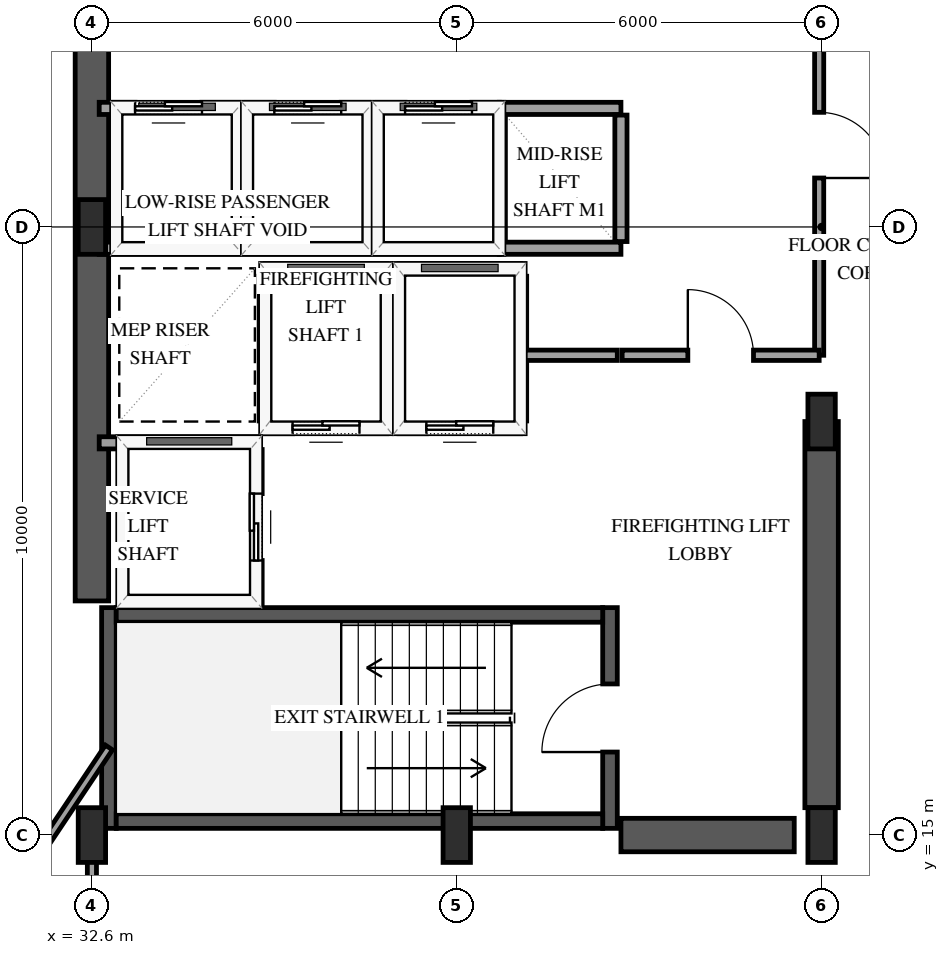
"""IFC4 building model, lengths in metres.
Left out: names, types, materials, properties, quantities, classifications, styles, units other than length and angle.
Written with IfcOpenShell. Run it as: python <this file> out.ifc"""

import sys

from ifc_helpers import new_model, si_unit, direction, frame, frame_2d, origin, origin_2d, place, context, subcontext, project, spatial, rectangle, extrude, element, fill, save


model = new_model("IFC4")
c1 = context("Model", 3, precision=1e-05, world=origin(), true_north=direction((0.0, 1.0)))
c2 = subcontext(c1, "Body", "Model", "MODEL_VIEW")
j1 = project(units=[si_unit("LENGTHUNIT", "METRE"), si_unit("PLANEANGLEUNIT", "RADIAN")], contexts=[c1])
p1 = place(None, origin())
s1 = spatial("IfcSite", under=j1, at=p1, CompositionType="ELEMENT")
p2 = place(p1, origin())
s2 = spatial("IfcBuilding", under=s1, at=p2, CompositionType="ELEMENT")
p3 = place(p2, frame((0.0, 0.0, 91.3)))
s3 = spatial("IfcBuildingStorey", under=s2, at=p3, CompositionType="ELEMENT", Elevation=91.3)
p4 = place(p3, frame((32.88, 15.11, 0.0), z_axis=(0.0, 0.0, 1.0), x_axis=(0.0, 1.0, 0.0)))
e1 = element("IfcWall", 1, at=p4, inside=s3, PredefinedType="SHEAR", context=c2, shape_type="SweptSolid", body=[
    extrude(rectangle(XDim=3.63, YDim=0.24, at=frame_2d((1.815, 0.0))), origin(), (0.0, 0.0, 1.0), 3.9),
])
p5 = place(p3, frame((41.12, 15.11, 0.0), z_axis=(0.0, 0.0, 1.0), x_axis=(0.0, 1.0, 0.0)))
e2 = element("IfcWall", 2, at=p5, inside=s3, PredefinedType="SHEAR", context=c2, shape_type="SweptSolid", body=[
    extrude(rectangle(XDim=3.63, YDim=0.24, at=frame_2d((1.815, 0.0))), origin(), (0.0, 0.0, 1.0), 3.9),
])
p6 = place(p5, frame((1.255, 0.0, 0.0)))
e3 = element("IfcOpeningElement", 3, at=p6, cuts=e2, PredefinedType="OPENING", context=c2, shape_type="SweptSolid", body=[
    extrude(rectangle(XDim=1.12, YDim=2.15, at=frame_2d((0.56, 1.075))), frame((0.0, 0.13, 0.0), z_axis=(0.0, -1.0, 0.0), x_axis=(1.0, 0.0, 0.0)), (0.0, 0.0, 1.0), 0.26),
])
for number, where, z_axis, x_axis in (
    (4, (33.0, 15.23, 0.0), (0.0, 0.0, 1.0), (1.0, 0.0, 0.0)),
    (5, (33.0, 18.62, 0.0), (0.0, 0.0, 1.0), (1.0, 0.0, 0.0)),
):
    element("IfcWall", number, at=place(p3, frame(where, z_axis=z_axis, x_axis=x_axis)), inside=s3, PredefinedType="SHEAR", context=c2, shape_type="SweptSolid", body=[
        extrude(rectangle(XDim=8.0, YDim=0.24, at=frame_2d((4.0, 0.0))), origin(), (0.0, 0.0, 1.0), 3.9),
    ])
p7 = place(p3, frame((32.6, 18.85, 0.0), z_axis=(0.0, 0.0, 1.0), x_axis=(0.0, 1.0, 0.0)))
e6 = element("IfcWall", 6, at=p7, inside=s3, PredefinedType="SHEAR", context=c2, shape_type="SweptSolid", body=[
    extrude(rectangle(XDim=12.3, YDim=0.55, at=frame_2d((6.15, 0.0))), origin(), (0.0, 0.0, 1.0), 3.9),
])
p8 = place(p3, frame((41.3, 15.0, 0.0), z_axis=(0.0, 0.0, 1.0), x_axis=(1.0, 0.0, 0.0)))
e7 = element("IfcWall", 7, at=p8, inside=s3, PredefinedType="SHEAR", context=c2, shape_type="SweptSolid", body=[
    extrude(rectangle(XDim=2.85, YDim=0.55, at=frame_2d((1.425, 0.0))), origin(), (0.0, 0.0, 1.0), 3.9),
])
p9 = place(p3, frame((44.6, 15.45, 0.0), z_axis=(0.0, 0.0, 1.0), x_axis=(0.0, 1.0, 0.0)))
e8 = element("IfcWall", 8, at=p9, inside=s3, PredefinedType="SHEAR", context=c2, shape_type="SweptSolid", body=[
    extrude(rectangle(XDim=6.35, YDim=0.55, at=frame_2d((3.175, 0.0))), origin(), (0.0, 0.0, 1.0), 3.9),
])
for number, where, z_axis, x_axis in (
    (9, (32.6, 15.0, 0.0), (0.0, 0.0, 1.0), (1.0, 0.0, 0.0)),
    (10, (32.6, 25.0, 0.0), (0.0, 0.0, 1.0), (1.0, 0.0, 0.0)),
    (11, (38.6, 15.0, 0.0), (0.0, 0.0, 1.0), (1.0, 0.0, 0.0)),
    (12, (44.6, 15.0, 0.0), (0.0, 0.0, 1.0), (1.0, 0.0, 0.0)),
    (13, (44.6, 21.8, 0.0), (0.0, 0.0, 1.0), (1.0, 0.0, 0.0)),
):
    element("IfcColumn", number, at=place(p3, frame(where, z_axis=z_axis, x_axis=x_axis)), inside=s3, PredefinedType="PILASTER", context=c2, shape_type="SweptSolid", body=[
        extrude(rectangle(XDim=0.45, YDim=0.9, at=origin_2d()), origin(), (0.0, 0.0, 1.0), 3.9),
    ])
p10 = place(p3, frame((35.45, 21.7, 0.0), z_axis=(0.0, 0.0, 1.0), x_axis=(1.0, 0.0, 0.0)))
e14 = element("IfcWall", 14, at=p10, inside=s3, PredefinedType="SOLIDWALL", context=c2, shape_type="SweptSolid", body=[
    extrude(rectangle(XDim=2.0, YDim=0.2, at=frame_2d((1.0, 0.0))), origin(), (0.0, 0.0, 1.0), 3.6),
])
p11 = place(p10, frame((0.45, 0.0, 0.0)))
e15 = element("IfcOpeningElement", 15, at=p11, cuts=e14, PredefinedType="OPENING", context=c2, shape_type="SweptSolid", body=[
    extrude(rectangle(XDim=1.1, YDim=2.15, at=frame_2d((0.55, 1.075))), frame((0.0, 0.11, 0.0), z_axis=(0.0, -1.0, 0.0), x_axis=(1.0, 0.0, 0.0)), (0.0, 0.0, 1.0), 0.22),
])
p12 = place(p3, frame((35.45, 24.3, 0.0), z_axis=(0.0, 0.0, 1.0), x_axis=(1.0, 0.0, 0.0)))
e16 = element("IfcWall", 16, at=p12, inside=s3, PredefinedType="SOLIDWALL", context=c2, shape_type="SweptSolid", body=[
    extrude(rectangle(XDim=2.0, YDim=0.2, at=frame_2d((1.0, 0.0))), origin(), (0.0, 0.0, 1.0), 3.6),
])
for number, where, z_axis, x_axis in (
    (17, (35.45, 21.81, 0.0), (0.0, 0.0, 1.0), (0.0, 1.0, 0.0)),
    (18, (37.45, 21.81, 0.0), (0.0, 0.0, 1.0), (0.0, 1.0, 0.0)),
):
    element("IfcWall", number, at=place(p3, frame(where, z_axis=z_axis, x_axis=x_axis)), inside=s3, PredefinedType="SOLIDWALL", context=c2, shape_type="SweptSolid", body=[
        extrude(rectangle(XDim=2.38, YDim=0.2, at=frame_2d((1.19, 0.0))), origin(), (0.0, 0.0, 1.0), 3.6),
    ])
p13 = place(p3, frame((37.65, 21.7, 0.0), z_axis=(0.0, 0.0, 1.0), x_axis=(1.0, 0.0, 0.0)))
e19 = element("IfcWall", 19, at=p13, inside=s3, PredefinedType="SOLIDWALL", context=c2, shape_type="SweptSolid", body=[
    extrude(rectangle(XDim=2.0, YDim=0.2, at=frame_2d((1.0, 0.0))), origin(), (0.0, 0.0, 1.0), 3.6),
])
p14 = place(p13, frame((0.45, 0.0, 0.0)))
e20 = element("IfcOpeningElement", 20, at=p14, cuts=e19, PredefinedType="OPENING", context=c2, shape_type="SweptSolid", body=[
    extrude(rectangle(XDim=1.1, YDim=2.15, at=frame_2d((0.55, 1.075))), frame((0.0, 0.11, 0.0), z_axis=(0.0, -1.0, 0.0), x_axis=(1.0, 0.0, 0.0)), (0.0, 0.0, 1.0), 0.22),
])
p15 = place(p3, frame((37.65, 24.3, 0.0), z_axis=(0.0, 0.0, 1.0), x_axis=(1.0, 0.0, 0.0)))
e21 = element("IfcWall", 21, at=p15, inside=s3, PredefinedType="SOLIDWALL", context=c2, shape_type="SweptSolid", body=[
    extrude(rectangle(XDim=2.0, YDim=0.2, at=frame_2d((1.0, 0.0))), origin(), (0.0, 0.0, 1.0), 3.6),
])
p16 = place(p3, frame((39.65, 21.81, 0.0), z_axis=(0.0, 0.0, 1.0), x_axis=(0.0, 1.0, 0.0)))
e22 = element("IfcWall", 22, at=p16, inside=s3, PredefinedType="SOLIDWALL", context=c2, shape_type="SweptSolid", body=[
    extrude(rectangle(XDim=2.38, YDim=0.2, at=frame_2d((1.19, 0.0))), origin(), (0.0, 0.0, 1.0), 3.6),
])
p17 = place(p3, frame((32.72, 21.45, 0.0), z_axis=(0.0, 0.0, 1.0), x_axis=(1.0, 0.0, 0.0)))
e23 = element("IfcWall", 23, at=p17, inside=s3, PredefinedType="SOLIDWALL", context=c2, shape_type="SweptSolid", body=[
    extrude(rectangle(XDim=2.58, YDim=0.2, at=frame_2d((1.29, 0.0))), origin(), (0.0, 0.0, 1.0), 3.6),
])
p18 = place(p3, frame((35.3, 18.79, 0.0), z_axis=(0.0, 0.0, 1.0), x_axis=(0.0, 1.0, 0.0)))
e24 = element("IfcWall", 24, at=p18, inside=s3, PredefinedType="SOLIDWALL", context=c2, shape_type="SweptSolid", body=[
    extrude(rectangle(XDim=2.55, YDim=0.2, at=frame_2d((1.275, 0.0))), origin(), (0.0, 0.0, 1.0), 3.6),
])
p19 = place(p18, frame((0.725, 0.0, 0.0)))
e25 = element("IfcOpeningElement", 25, at=p19, cuts=e24, PredefinedType="OPENING", context=c2, shape_type="SweptSolid", body=[
    extrude(rectangle(XDim=1.1, YDim=2.15, at=frame_2d((0.55, 1.075))), frame((0.0, 0.11, 0.0), z_axis=(0.0, -1.0, 0.0), x_axis=(1.0, 0.0, 0.0)), (0.0, 0.0, 1.0), 0.22),
])
p20 = place(p3, frame((32.72, 24.65, 0.0), z_axis=(0.0, 0.0, 1.0), x_axis=(1.0, 0.0, 0.0)))
e26 = element("IfcWall", 26, at=p20, inside=s3, PredefinedType="SOLIDWALL", context=c2, shape_type="SweptSolid", body=[
    extrude(rectangle(XDim=2.28, YDim=0.2, at=frame_2d((1.14, 0.0))), origin(), (0.0, 0.0, 1.0), 3.6),
])
p21 = place(p3, frame((32.72, 26.95, 0.0), z_axis=(0.0, 0.0, 1.0), x_axis=(1.0, 0.0, 0.0)))
e27 = element("IfcWall", 27, at=p21, inside=s3, PredefinedType="SOLIDWALL", context=c2, shape_type="SweptSolid", body=[
    extrude(rectangle(XDim=2.28, YDim=0.2, at=frame_2d((1.14, 0.0))), origin(), (0.0, 0.0, 1.0), 3.6),
])
p22 = place(p21, frame((0.59, 0.0, 0.0)))
e28 = element("IfcOpeningElement", 28, at=p22, cuts=e27, PredefinedType="OPENING", context=c2, shape_type="SweptSolid", body=[
    extrude(rectangle(XDim=1.1, YDim=2.15, at=frame_2d((0.55, 1.075))), frame((0.0, 0.11, 0.0), z_axis=(0.0, -1.0, 0.0), x_axis=(1.0, 0.0, 0.0)), (0.0, 0.0, 1.0), 0.22),
])
p23 = place(p3, frame((35.0, 24.76, 0.0), z_axis=(0.0, 0.0, 1.0), x_axis=(0.0, 1.0, 0.0)))
e29 = element("IfcWall", 29, at=p23, inside=s3, PredefinedType="SOLIDWALL", context=c2, shape_type="SweptSolid", body=[
    extrude(rectangle(XDim=2.08, YDim=0.2, at=frame_2d((1.04, 0.0))), origin(), (0.0, 0.0, 1.0), 3.6),
])
p24 = place(p3, frame((35.15, 24.65, 0.0), z_axis=(0.0, 0.0, 1.0), x_axis=(1.0, 0.0, 0.0)))
e30 = element("IfcWall", 30, at=p24, inside=s3, PredefinedType="SOLIDWALL", context=c2, shape_type="SweptSolid", body=[
    extrude(rectangle(XDim=2.0, YDim=0.2, at=frame_2d((1.0, 0.0))), origin(), (0.0, 0.0, 1.0), 3.6),
])
p25 = place(p3, frame((35.15, 26.95, 0.0), z_axis=(0.0, 0.0, 1.0), x_axis=(1.0, 0.0, 0.0)))
e31 = element("IfcWall", 31, at=p25, inside=s3, PredefinedType="SOLIDWALL", context=c2, shape_type="SweptSolid", body=[
    extrude(rectangle(XDim=2.0, YDim=0.2, at=frame_2d((1.0, 0.0))), origin(), (0.0, 0.0, 1.0), 3.6),
])
p26 = place(p25, frame((0.45, 0.0, 0.0)))
e32 = element("IfcOpeningElement", 32, at=p26, cuts=e31, PredefinedType="OPENING", context=c2, shape_type="SweptSolid", body=[
    extrude(rectangle(XDim=1.1, YDim=2.15, at=frame_2d((0.55, 1.075))), frame((0.0, 0.11, 0.0), z_axis=(0.0, -1.0, 0.0), x_axis=(1.0, 0.0, 0.0)), (0.0, 0.0, 1.0), 0.22),
])
p27 = place(p3, frame((37.15, 24.76, 0.0), z_axis=(0.0, 0.0, 1.0), x_axis=(0.0, 1.0, 0.0)))
e33 = element("IfcWall", 33, at=p27, inside=s3, PredefinedType="SOLIDWALL", context=c2, shape_type="SweptSolid", body=[
    extrude(rectangle(XDim=2.08, YDim=0.2, at=frame_2d((1.04, 0.0))), origin(), (0.0, 0.0, 1.0), 3.6),
])
p28 = place(p3, frame((37.3, 24.65, 0.0), z_axis=(0.0, 0.0, 1.0), x_axis=(1.0, 0.0, 0.0)))
e34 = element("IfcWall", 34, at=p28, inside=s3, PredefinedType="SOLIDWALL", context=c2, shape_type="SweptSolid", body=[
    extrude(rectangle(XDim=2.0, YDim=0.2, at=frame_2d((1.0, 0.0))), origin(), (0.0, 0.0, 1.0), 3.6),
])
p29 = place(p3, frame((37.3, 26.95, 0.0), z_axis=(0.0, 0.0, 1.0), x_axis=(1.0, 0.0, 0.0)))
e35 = element("IfcWall", 35, at=p29, inside=s3, PredefinedType="SOLIDWALL", context=c2, shape_type="SweptSolid", body=[
    extrude(rectangle(XDim=2.0, YDim=0.2, at=frame_2d((1.0, 0.0))), origin(), (0.0, 0.0, 1.0), 3.6),
])
p30 = place(p29, frame((0.45, 0.0, 0.0)))
e36 = element("IfcOpeningElement", 36, at=p30, cuts=e35, PredefinedType="OPENING", context=c2, shape_type="SweptSolid", body=[
    extrude(rectangle(XDim=1.1, YDim=2.15, at=frame_2d((0.55, 1.075))), frame((0.0, 0.11, 0.0), z_axis=(0.0, -1.0, 0.0), x_axis=(1.0, 0.0, 0.0)), (0.0, 0.0, 1.0), 0.22),
])
p31 = place(p3, frame((39.3, 24.76, 0.0), z_axis=(0.0, 0.0, 1.0), x_axis=(0.0, 1.0, 0.0)))
e37 = element("IfcWall", 37, at=p31, inside=s3, PredefinedType="SOLIDWALL", context=c2, shape_type="SweptSolid", body=[
    extrude(rectangle(XDim=2.08, YDim=0.2, at=frame_2d((1.04, 0.0))), origin(), (0.0, 0.0, 1.0), 3.6),
])
for number, where, z_axis, x_axis in (
    (38, (39.3, 24.65, 0.0), (0.0, 0.0, 1.0), (1.0, 0.0, 0.0)),
    (39, (39.3, 26.95, 0.0), (0.0, 0.0, 1.0), (1.0, 0.0, 0.0)),
):
    element("IfcWall", number, at=place(p3, frame(where, z_axis=z_axis, x_axis=x_axis)), inside=s3, PredefinedType="SOLIDWALL", context=c2, shape_type="SweptSolid", body=[
        extrude(rectangle(XDim=2.0, YDim=0.2, at=frame_2d((1.0, 0.0))), origin(), (0.0, 0.0, 1.0), 3.6),
    ])
p32 = place(p3, frame((41.3, 24.76, 0.0), z_axis=(0.0, 0.0, 1.0), x_axis=(0.0, 1.0, 0.0)))
e40 = element("IfcWall", 40, at=p32, inside=s3, PredefinedType="SOLIDWALL", context=c2, shape_type="SweptSolid", body=[
    extrude(rectangle(XDim=2.08, YDim=0.2, at=frame_2d((1.04, 0.0))), origin(), (0.0, 0.0, 1.0), 3.6),
])
p33 = place(p3, frame((44.56, 29.8, 0.0), z_axis=(0.0, 0.0, 1.0), x_axis=(0.0, -1.0, 0.0)))
e41 = element("IfcWall", 41, at=p33, inside=s3, PredefinedType="PARTITIONING", context=c2, shape_type="SweptSolid", body=[
    extrude(rectangle(XDim=6.91, YDim=0.15, at=frame_2d((3.455, 0.0))), origin(), (0.0, 0.0, 1.0), 2.64),
])
p34 = place(p33, frame((2.915, 0.0, 0.0)))
e42 = element("IfcOpeningElement", 42, at=p34, cuts=e41, PredefinedType="OPENING", context=c2, shape_type="SweptSolid", body=[
    extrude(rectangle(XDim=1.08, YDim=2.15, at=frame_2d((0.54, 1.075))), frame((0.0, 0.085, 0.0), z_axis=(0.0, -1.0, 0.0), x_axis=(1.0, 0.0, 0.0)), (0.0, 0.0, 1.0), 0.17),
])
p35 = place(p3, frame((32.88, 16.44, 0.0), z_axis=(0.0, 0.0, 1.0), x_axis=(-0.555516811992, -0.83150530461, 0.0)))
e43 = element("IfcWall", 43, at=p35, inside=s3, PredefinedType="PARTITIONING", context=c2, shape_type="SweptSolid", body=[
    extrude(rectangle(XDim=4.138, YDim=0.14, at=frame_2d((2.069, 0.0))), origin(), (0.0, 0.0, 1.0), 3.6),
])
p36 = place(p3, frame((41.32, 22.89, 0.0), z_axis=(0.0, 0.0, 1.0), x_axis=(1.0, 0.0, 0.0)))
e44 = element("IfcWall", 44, at=p36, inside=s3, PredefinedType="PARTITIONING", context=c2, shape_type="SweptSolid", body=[
    extrude(rectangle(XDim=3.24, YDim=0.17, at=frame_2d((1.62, 0.0))), origin(), (0.0, 0.0, 1.0), 3.6),
])
p37 = place(p36, frame((1.08, 0.0, 0.0)))
e45 = element("IfcOpeningElement", 45, at=p37, cuts=e44, PredefinedType="OPENING", context=c2, shape_type="SweptSolid", body=[
    extrude(rectangle(XDim=1.08, YDim=2.15, at=frame_2d((0.54, 1.075))), frame((0.0, 0.095, 0.0), z_axis=(0.0, -1.0, 0.0), x_axis=(1.0, 0.0, 0.0)), (0.0, 0.0, 1.0), 0.19),
])
p38 = place(p3, frame((32.6, 13.02, 0.0), z_axis=(0.0, 0.0, 1.0), x_axis=(0.0, 1.0, 0.0)))
e46 = element("IfcWall", 46, at=p38, inside=s3, PredefinedType="PARTITIONING", context=c2, shape_type="SweptSolid", body=[
    extrude(rectangle(XDim=1.91, YDim=0.15, at=frame_2d((0.955, 0.0))), origin(), (0.0, 0.0, 1.0), 3.6),
])
p39 = place(p3, frame((39.72, 22.89, 0.0), z_axis=(0.0, 0.0, 1.0), x_axis=(1.0, 0.0, 0.0)))
e47 = element("IfcWall", 47, at=p39, inside=s3, PredefinedType="PARTITIONING", context=c2, shape_type="SweptSolid", body=[
    extrude(rectangle(XDim=1.52, YDim=0.17, at=frame_2d((0.76, 0.0))), origin(), (0.0, 0.0, 1.0), 3.6),
])
p40 = place(p11, origin())
e48 = element("IfcDoor", 48, at=p40, inside=s3, OperationType="SLIDING_TO_LEFT", PredefinedType="DOOR", context=c2, shape_type="SweptSolid", body=[
    extrude(rectangle(XDim=1.1, YDim=2.15, at=frame_2d((0.55, 1.075))), frame((0.0, 0.025, 0.0), z_axis=(0.0, -1.0, 0.0), x_axis=(1.0, 0.0, 0.0)), (0.0, 0.0, 1.0), 0.05),
])
fill(e15, e48)
p41 = place(p14, origin())
e49 = element("IfcDoor", 49, at=p41, inside=s3, OperationType="SLIDING_TO_LEFT", PredefinedType="DOOR", context=c2, shape_type="SweptSolid", body=[
    extrude(rectangle(XDim=1.1, YDim=2.15, at=frame_2d((0.55, 1.075))), frame((0.0, 0.025, 0.0), z_axis=(0.0, -1.0, 0.0), x_axis=(1.0, 0.0, 0.0)), (0.0, 0.0, 1.0), 0.05),
])
fill(e20, e49)
p42 = place(p19, origin())
e50 = element("IfcDoor", 50, at=p42, inside=s3, OperationType="SLIDING_TO_LEFT", PredefinedType="DOOR", context=c2, shape_type="SweptSolid", body=[
    extrude(rectangle(XDim=1.1, YDim=2.15, at=frame_2d((0.55, 1.075))), frame((0.0, 0.025, 0.0), z_axis=(0.0, -1.0, 0.0), x_axis=(1.0, 0.0, 0.0)), (0.0, 0.0, 1.0), 0.05),
])
fill(e25, e50)
p43 = place(p22, origin())
e51 = element("IfcDoor", 51, at=p43, inside=s3, OperationType="SLIDING_TO_LEFT", PredefinedType="DOOR", context=c2, shape_type="SweptSolid", body=[
    extrude(rectangle(XDim=1.1, YDim=2.15, at=frame_2d((0.55, 1.075))), frame((0.0, 0.025, 0.0), z_axis=(0.0, -1.0, 0.0), x_axis=(1.0, 0.0, 0.0)), (0.0, 0.0, 1.0), 0.05),
])
fill(e28, e51)
p44 = place(p26, origin())
e52 = element("IfcDoor", 52, at=p44, inside=s3, OperationType="SLIDING_TO_LEFT", PredefinedType="DOOR", context=c2, shape_type="SweptSolid", body=[
    extrude(rectangle(XDim=1.1, YDim=2.15, at=frame_2d((0.55, 1.075))), frame((0.0, 0.025, 0.0), z_axis=(0.0, -1.0, 0.0), x_axis=(1.0, 0.0, 0.0)), (0.0, 0.0, 1.0), 0.05),
])
fill(e32, e52)
p45 = place(p30, origin())
e53 = element("IfcDoor", 53, at=p45, inside=s3, OperationType="SLIDING_TO_LEFT", PredefinedType="DOOR", context=c2, shape_type="SweptSolid", body=[
    extrude(rectangle(XDim=1.1, YDim=2.15, at=frame_2d((0.55, 1.075))), frame((0.0, 0.025, 0.0), z_axis=(0.0, -1.0, 0.0), x_axis=(1.0, 0.0, 0.0)), (0.0, 0.0, 1.0), 0.05),
])
fill(e36, e53)
p46 = place(p6, origin())
e54 = element("IfcDoor", 54, at=p46, inside=s3, OperationType="SINGLE_SWING_LEFT", PredefinedType="DOOR", context=c2, shape_type="SweptSolid", body=[
    extrude(rectangle(XDim=1.12, YDim=2.15, at=frame_2d((0.56, 1.075))), frame((0.0, 0.025, 0.0), z_axis=(0.0, -1.0, 0.0), x_axis=(1.0, 0.0, 0.0)), (0.0, 0.0, 1.0), 0.05),
])
fill(e3, e54)
p47 = place(p34, origin())
e55 = element("IfcDoor", 55, at=p47, inside=s3, OperationType="SINGLE_SWING_RIGHT", PredefinedType="DOOR", context=c2, shape_type="SweptSolid", body=[
    extrude(rectangle(XDim=1.08, YDim=2.15, at=frame_2d((0.54, 1.075))), frame((0.0, 0.025, 0.0), z_axis=(0.0, -1.0, 0.0), x_axis=(1.0, 0.0, 0.0)), (0.0, 0.0, 1.0), 0.05),
])
fill(e42, e55)
p48 = place(p37, origin())
e56 = element("IfcDoor", 56, at=p48, inside=s3, OperationType="SINGLE_SWING_LEFT", PredefinedType="DOOR", context=c2, shape_type="SweptSolid", body=[
    extrude(rectangle(XDim=1.08, YDim=2.15, at=frame_2d((0.54, 1.075))), frame((0.0, 0.025, 0.0), z_axis=(0.0, -1.0, 0.0), x_axis=(1.0, 0.0, 0.0)), (0.0, 0.0, 1.0), 0.05),
])
fill(e45, e56)
save(model, sys.argv[1])
